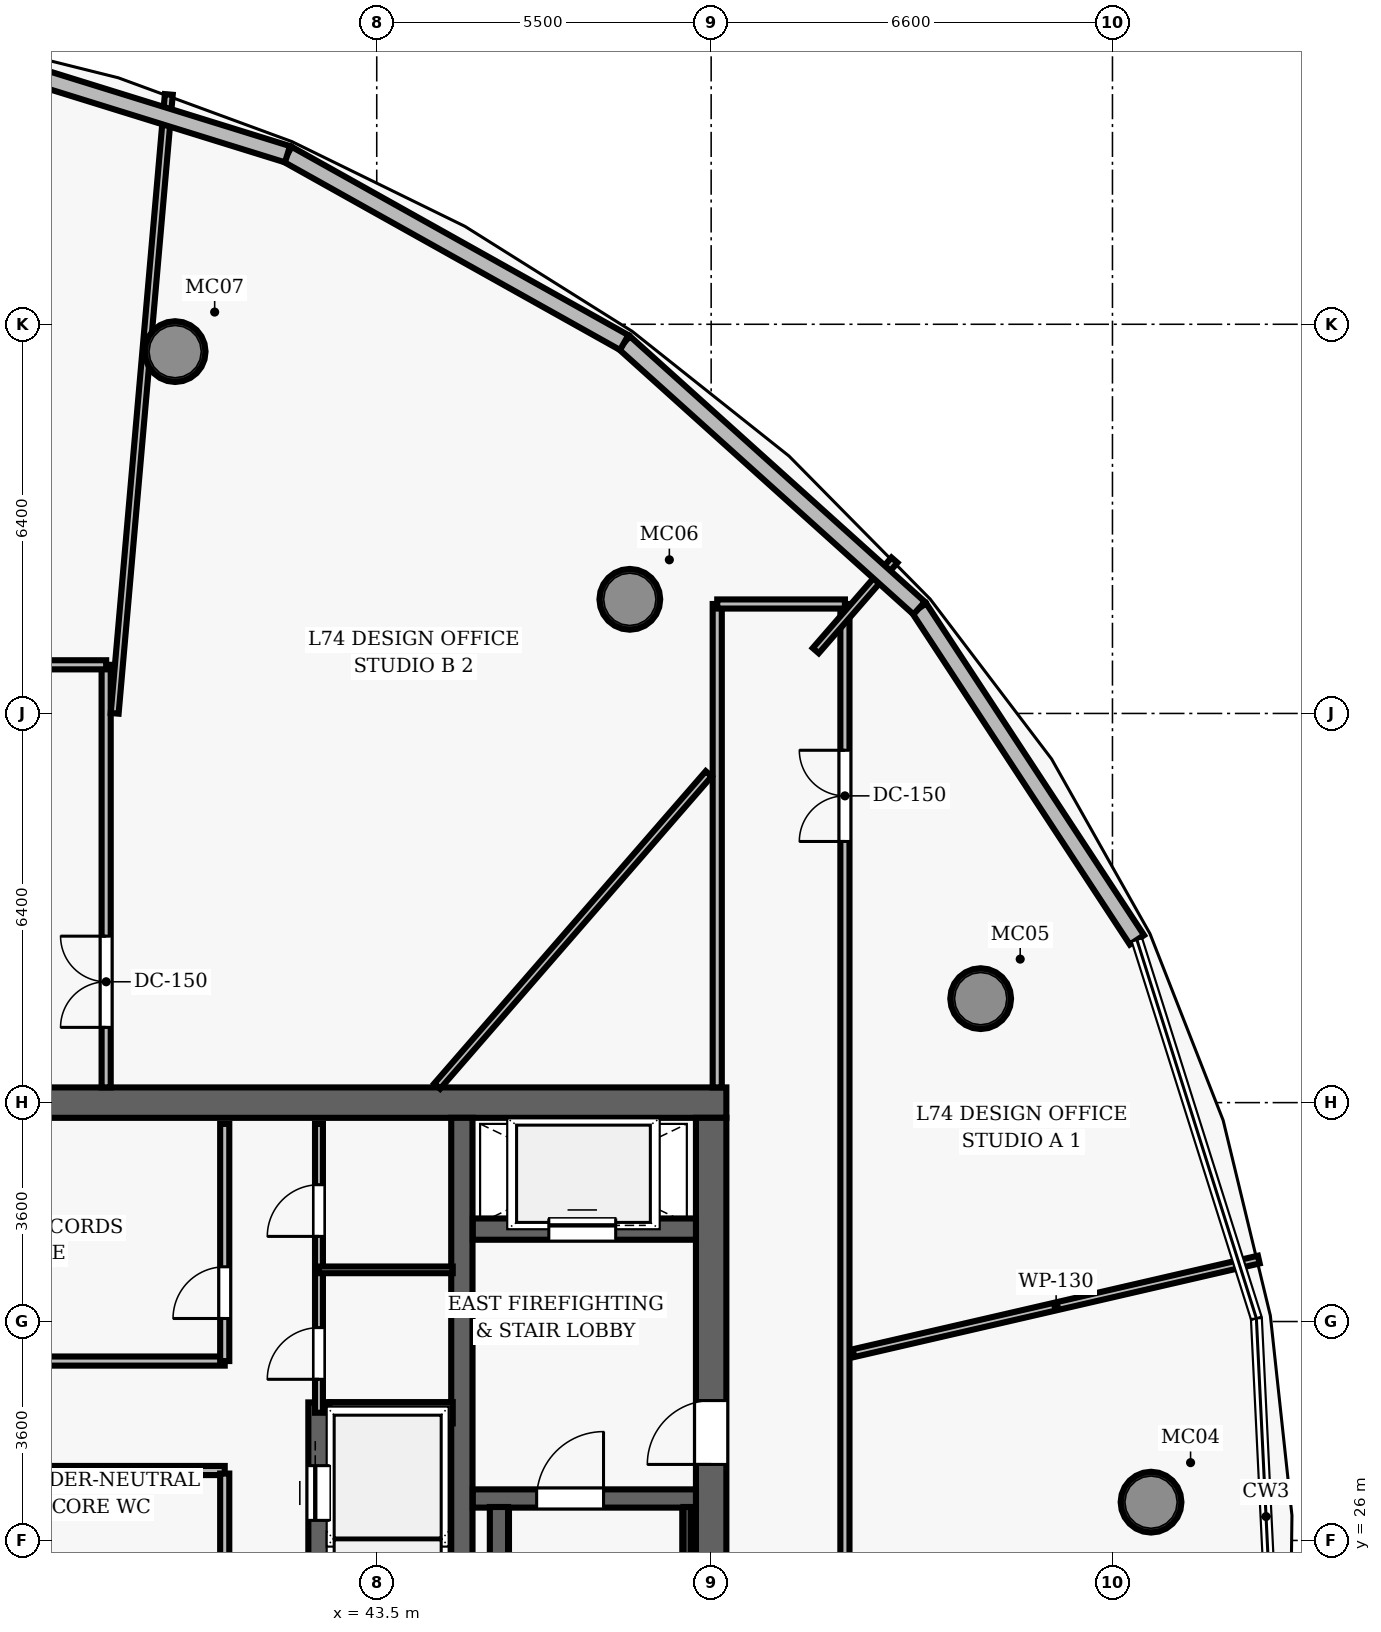
"""IFC4 building model, lengths in metres.
Left out: names, types, materials, properties, quantities, classifications, styles, units other than length and angle.
Written with IfcOpenShell. Run it as: python <this file> out.ifc"""

import sys

from ifc_helpers import new_model, si_unit, direction, frame, frame_2d, origin, origin_2d, place, context, subcontext, project, spatial, rectangle, hollow_circle, extrude, element, fill, save


model = new_model("IFC4")
c1 = context("Model", 3, precision=1e-05, world=origin(), true_north=direction((0.0, 1.0)))
c2 = subcontext(c1, "Body", "Model", "MODEL_VIEW")
j1 = project(units=[si_unit("LENGTHUNIT", "METRE"), si_unit("PLANEANGLEUNIT", "RADIAN")], contexts=[c1])
p1 = place(None, origin())
s1 = spatial("IfcSite", under=j1, at=p1, CompositionType="ELEMENT")
p2 = place(p1, origin())
s2 = spatial("IfcBuilding", under=s1, at=p2, CompositionType="ELEMENT")
p3 = place(p2, frame((0.0, 0.0, 292.1)))
s3 = spatial("IfcBuildingStorey", under=s2, at=p3, CompositionType="ELEMENT", Elevation=292.1)
p4 = place(p3, frame((26.75, 33.2, 0.0), z_axis=(0.0, 0.0, 1.0), x_axis=(1.0, 0.0, 0.0)))
e1 = element("IfcWall", 1, at=p4, inside=s3, PredefinedType="SHEAR", context=c2, shape_type="SweptSolid", body=[
    extrude(rectangle(XDim=22.5, YDim=0.5, at=frame_2d((11.25, 0.0))), origin(), (0.0, 0.0, 1.0), 3.85),
])
p5 = place(p3, frame((49.0, 19.05, 0.0), z_axis=(0.0, 0.0, 1.0), x_axis=(0.0, 1.0, 0.0)))
e2 = element("IfcWall", 2, at=p5, inside=s3, PredefinedType="SHEAR", context=c2, shape_type="SweptSolid", body=[
    extrude(rectangle(XDim=13.9, YDim=0.5, at=frame_2d((6.95, 0.0))), origin(), (0.0, 0.0, 1.0), 3.85),
])
p6 = place(p5, frame((8.2, 0.0, 0.0)))
e3 = element("IfcOpeningElement", 3, at=p6, cuts=e2, PredefinedType="OPENING", context=c2, shape_type="SweptSolid", body=[
    extrude(rectangle(XDim=1.05, YDim=2.15, at=frame_2d((0.525, 1.075))), frame((0.0, 0.26, 0.0), z_axis=(0.0, -1.0, 0.0), x_axis=(1.0, 0.0, 0.0)), (0.0, 0.0, 1.0), 0.52),
])
p7 = place(p3, frame((44.9, 19.05, 0.0), z_axis=(0.0, 0.0, 1.0), x_axis=(0.0, 1.0, 0.0)))
e4 = element("IfcWall", 4, at=p7, inside=s3, PredefinedType="SHEAR", context=c2, shape_type="SweptSolid", body=[
    extrude(rectangle(XDim=13.9, YDim=0.35, at=frame_2d((6.95, 0.0))), origin(), (0.0, 0.0, 1.0), 3.85),
])
for number, where, z_axis, x_axis in (
    (5, (56.235, 26.629, 0.0), (0.0, 0.0, 1.0), (1.0, 0.0, 0.0)),
    (6, (53.433, 34.91, 0.0), (0.0, 0.0, 1.0), (1.0, 0.0, 0.0)),
    (7, (47.662, 41.477, 0.0), (0.0, 0.0, 1.0), (1.0, 0.0, 0.0)),
    (8, (40.185, 45.551, 0.0), (0.0, 0.0, 1.0), (1.0, 0.0, 0.0)),
):
    element("IfcColumn", number, at=place(p3, frame(where, z_axis=z_axis, x_axis=x_axis)), inside=s3, PredefinedType="COLUMN", context=c2, shape_type="SweptSolid", body=[
        extrude(hollow_circle(Radius=0.5, WallThickness=0.045, at=origin_2d()), origin(), (0.0, 0.0, 1.0), 3.85),
    ])
p8 = place(p3, frame((45.08, 26.69, 0.0), z_axis=(0.0, 0.0, 1.0), x_axis=(1.0, 0.0, 0.0)))
e9 = element("IfcWall", 9, at=p8, inside=s3, PredefinedType="SHEAR", context=c2, shape_type="SweptSolid", body=[
    extrude(rectangle(XDim=3.67, YDim=0.3, at=frame_2d((1.835, 0.0))), origin(), (0.0, 0.0, 1.0), 3.85),
])
p9 = place(p8, frame((1.05, 0.0, 0.0)))
e10 = element("IfcOpeningElement", 10, at=p9, cuts=e9, PredefinedType="OPENING", context=c2, shape_type="SweptSolid", body=[
    extrude(rectangle(XDim=1.1, YDim=2.15, at=frame_2d((0.55, 1.075))), frame((0.0, 0.16, 0.0), z_axis=(0.0, -1.0, 0.0), x_axis=(1.0, 0.0, 0.0)), (0.0, 0.0, 1.0), 0.32),
])
p10 = place(p3, frame((45.51, 19.05, 0.0), z_axis=(0.0, 0.0, 1.0), x_axis=(0.0, 1.0, 0.0)))
e11 = element("IfcWall", 11, at=p10, inside=s3, PredefinedType="SHEAR", context=c2, shape_type="SweptSolid", body=[
    extrude(rectangle(XDim=7.5, YDim=0.3, at=frame_2d((3.75, 0.0))), origin(), (0.0, 0.0, 1.0), 3.85),
])
p11 = place(p3, frame((48.605, 19.1, 0.0), z_axis=(0.0, 0.0, 1.0), x_axis=(0.0, 1.0, 0.0)))
e12 = element("IfcWall", 12, at=p11, inside=s3, PredefinedType="SHEAR", context=c2, shape_type="SweptSolid", body=[
    extrude(rectangle(XDim=7.45, YDim=0.12, at=frame_2d((3.725, 0.0))), origin(), (0.0, 0.0, 1.0), 3.85),
])
p12 = place(p3, frame((45.08, 31.12, 0.0), z_axis=(0.0, 0.0, 1.0), x_axis=(1.0, 0.0, 0.0)))
e13 = element("IfcWall", 13, at=p12, inside=s3, PredefinedType="SHEAR", context=c2, shape_type="SweptSolid", body=[
    extrude(rectangle(XDim=3.67, YDim=0.35, at=frame_2d((1.835, 0.0))), origin(), (0.0, 0.0, 1.0), 3.04),
])
p13 = place(p12, frame((1.25, 0.0, 0.0)))
e14 = element("IfcOpeningElement", 14, at=p13, cuts=e13, PredefinedType="OPENING", context=c2, shape_type="SweptSolid", body=[
    extrude(rectangle(XDim=1.1, YDim=2.15, at=frame_2d((0.55, 1.075))), frame((0.0, 0.185, 0.0), z_axis=(0.0, -1.0, 0.0), x_axis=(1.0, 0.0, 0.0)), (0.0, 0.0, 1.0), 0.37),
])
p14 = place(p3, frame((42.55, 21.73, 0.0), z_axis=(0.0, 0.0, 1.0), x_axis=(0.0, 1.0, 0.0)))
e15 = element("IfcWall", 15, at=p14, inside=s3, PredefinedType="SHEAR", context=c2, shape_type="SweptSolid", body=[
    extrude(rectangle(XDim=6.54, YDim=0.35, at=frame_2d((3.27, 0.0))), origin(), (0.0, 0.0, 1.0), 3.04),
])
p15 = place(p14, frame((0.5, 0.0, 0.0)))
e16 = element("IfcOpeningElement", 16, at=p15, cuts=e15, PredefinedType="OPENING", context=c2, shape_type="SweptSolid", body=[
    extrude(rectangle(XDim=0.9, YDim=2.15, at=frame_2d((0.45, 1.075))), frame((0.0, 0.185, 0.0), z_axis=(0.0, -1.0, 0.0), x_axis=(1.0, 0.0, 0.0)), (0.0, 0.0, 1.0), 0.37),
])
p16 = place(p14, frame((2.55, 0.0, 0.0)))
e17 = element("IfcOpeningElement", 17, at=p16, cuts=e15, PredefinedType="OPENING", context=c2, shape_type="SweptSolid", body=[
    extrude(rectangle(XDim=0.9, YDim=2.15, at=frame_2d((0.45, 1.075))), frame((0.0, 0.185, 0.0), z_axis=(0.0, -1.0, 0.0), x_axis=(1.0, 0.0, 0.0)), (0.0, 0.0, 1.0), 0.37),
])
p17 = place(p14, frame((4.6, 0.0, 0.0)))
e18 = element("IfcOpeningElement", 18, at=p17, cuts=e15, PredefinedType="OPENING", context=c2, shape_type="SweptSolid", body=[
    extrude(rectangle(XDim=0.9, YDim=2.15, at=frame_2d((0.45, 1.075))), frame((0.0, 0.185, 0.0), z_axis=(0.0, -1.0, 0.0), x_axis=(1.0, 0.0, 0.0)), (0.0, 0.0, 1.0), 0.37),
])
p18 = place(p3, frame((42.72, 28.1, 0.0), z_axis=(0.0, 0.0, 1.0), x_axis=(1.0, 0.0, 0.0)))
e19 = element("IfcWall", 19, at=p18, inside=s3, PredefinedType="SHEAR", context=c2, shape_type="SweptSolid", body=[
    extrude(rectangle(XDim=2.03, YDim=0.35, at=frame_2d((1.015, 0.0))), origin(), (0.0, 0.0, 1.0), 3.04),
])
for number, where, z_axis, x_axis in (
    (20, (34.64, 27.15, 0.0), (0.0, 0.0, 1.0), (1.0, 0.0, 0.0)),
    (21, (34.64, 28.95, 0.0), (0.0, 0.0, 1.0), (1.0, 0.0, 0.0)),
):
    element("IfcWall", number, at=place(p3, frame(where, z_axis=z_axis, x_axis=x_axis)), inside=s3, PredefinedType="PARTITIONING", context=c2, shape_type="SweptSolid", body=[
        extrude(rectangle(XDim=6.36, YDim=0.15, at=frame_2d((3.18, 0.0))), origin(), (0.0, 0.0, 1.0), 3.04),
    ])
p19 = place(p3, frame((41.0, 28.95, 0.0), z_axis=(0.0, 0.0, 1.0), x_axis=(0.0, 1.0, 0.0)))
e22 = element("IfcWall", 22, at=p19, inside=s3, PredefinedType="PARTITIONING", context=c2, shape_type="SweptSolid", body=[
    extrude(rectangle(XDim=3.9, YDim=0.15, at=frame_2d((1.95, 0.0))), origin(), (0.0, 0.0, 1.0), 3.04),
])
p20 = place(p19, frame((0.7, 0.0, 0.0)))
e23 = element("IfcOpeningElement", 23, at=p20, cuts=e22, PredefinedType="OPENING", context=c2, shape_type="SweptSolid", body=[
    extrude(rectangle(XDim=0.85, YDim=2.1, at=frame_2d((0.425, 1.05))), frame((0.0, 0.085, 0.0), z_axis=(0.0, -1.0, 0.0), x_axis=(1.0, 0.0, 0.0)), (0.0, 0.0, 1.0), 0.17),
])
p21 = place(p3, frame((41.0, 19.15, 0.0), z_axis=(0.0, 0.0, 1.0), x_axis=(0.0, 1.0, 0.0)))
e24 = element("IfcWall", 24, at=p21, inside=s3, PredefinedType="PARTITIONING", context=c2, shape_type="SweptSolid", body=[
    extrude(rectangle(XDim=7.95, YDim=0.15, at=frame_2d((3.975, 0.0))), origin(), (0.0, 0.0, 1.0), 3.04),
])
p22 = place(p21, frame((0.25, 0.0, 0.0)))
e25 = element("IfcOpeningElement", 25, at=p22, cuts=e24, PredefinedType="OPENING", context=c2, shape_type="SweptSolid", body=[
    extrude(rectangle(XDim=0.85, YDim=2.1, at=frame_2d((0.425, 1.05))), frame((0.0, 0.085, 0.0), z_axis=(0.0, -1.0, 0.0), x_axis=(1.0, 0.0, 0.0)), (0.0, 0.0, 1.0), 0.17),
])
p23 = place(p21, frame((2.953, 0.0, 0.0)))
e26 = element("IfcOpeningElement", 26, at=p23, cuts=e24, PredefinedType="OPENING", context=c2, shape_type="SweptSolid", body=[
    extrude(rectangle(XDim=0.85, YDim=2.1, at=frame_2d((0.425, 1.05))), frame((0.0, 0.085, 0.0), z_axis=(0.0, -1.0, 0.0), x_axis=(1.0, 0.0, 0.0)), (0.0, 0.0, 1.0), 0.17),
])
p24 = place(p21, frame((5.576, 0.0, 0.0)))
e27 = element("IfcOpeningElement", 27, at=p24, cuts=e24, PredefinedType="OPENING", context=c2, shape_type="SweptSolid", body=[
    extrude(rectangle(XDim=0.85, YDim=2.1, at=frame_2d((0.425, 1.05))), frame((0.0, 0.085, 0.0), z_axis=(0.0, -1.0, 0.0), x_axis=(1.0, 0.0, 0.0)), (0.0, 0.0, 1.0), 0.17),
])
p25 = place(p3, frame((42.55, 28.1, 0.0), z_axis=(0.0, 0.0, 1.0), x_axis=(0.0, 1.0, 0.0)))
e28 = element("IfcWall", 28, at=p25, inside=s3, PredefinedType="PARTITIONING", context=c2, shape_type="SweptSolid", body=[
    extrude(rectangle(XDim=4.75, YDim=0.13, at=frame_2d((2.375, 0.0))), origin(), (0.0, 0.0, 1.0), 3.04),
])
p26 = place(p25, frame((0.55, 0.0, 0.0)))
e29 = element("IfcOpeningElement", 29, at=p26, cuts=e28, PredefinedType="OPENING", context=c2, shape_type="SweptSolid", body=[
    extrude(rectangle(XDim=0.85, YDim=2.1, at=frame_2d((0.425, 1.05))), frame((0.0, 0.075, 0.0), z_axis=(0.0, -1.0, 0.0), x_axis=(1.0, 0.0, 0.0)), (0.0, 0.0, 1.0), 0.15),
])
p27 = place(p25, frame((2.9, 0.0, 0.0)))
e30 = element("IfcOpeningElement", 30, at=p27, cuts=e28, PredefinedType="OPENING", context=c2, shape_type="SweptSolid", body=[
    extrude(rectangle(XDim=0.85, YDim=2.1, at=frame_2d((0.425, 1.05))), frame((0.0, 0.075, 0.0), z_axis=(0.0, -1.0, 0.0), x_axis=(1.0, 0.0, 0.0)), (0.0, 0.0, 1.0), 0.15),
])
p28 = place(p3, frame((42.55, 30.45, 0.0), z_axis=(0.0, 0.0, 1.0), x_axis=(1.0, 0.0, 0.0)))
e31 = element("IfcWall", 31, at=p28, inside=s3, PredefinedType="PARTITIONING", context=c2, shape_type="SweptSolid", body=[
    extrude(rectangle(XDim=2.2, YDim=0.11, at=frame_2d((1.1, 0.0))), origin(), (0.0, 0.0, 1.0), 3.04),
])
p29 = place(p3, frame((51.2, 10.6, 0.0), z_axis=(0.0, 0.0, 1.0), x_axis=(0.0, 1.0, 0.0)))
e32 = element("IfcWall", 32, at=p29, inside=s3, PredefinedType="PARTITIONING", context=c2, shape_type="SweptSolid", body=[
    extrude(rectangle(XDim=30.8, YDim=0.15, at=frame_2d((15.4, 0.0))), origin(), (0.0, 0.0, 1.0), 3.04),
])
p30 = place(p29, frame((26.895, 0.0, 0.0)))
e33 = element("IfcOpeningElement", 33, at=p30, cuts=e32, PredefinedType="OPENING", context=c2, shape_type="SweptSolid", body=[
    extrude(rectangle(XDim=1.5, YDim=2.2, at=frame_2d((0.75, 1.1))), frame((0.0, 0.085, 0.0), z_axis=(0.0, -1.0, 0.0), x_axis=(1.0, 0.0, 0.0)), (0.0, 0.0, 1.0), 0.17),
])
p31 = place(p29, frame((11.03, 0.0, 0.0)))
e34 = element("IfcOpeningElement", 34, at=p31, cuts=e32, PredefinedType="OPENING", context=c2, shape_type="SweptSolid", body=[
    extrude(rectangle(XDim=1.5, YDim=2.2, at=frame_2d((0.75, 1.1))), frame((0.0, 0.085, 0.0), z_axis=(0.0, -1.0, 0.0), x_axis=(1.0, 0.0, 0.0)), (0.0, 0.0, 1.0), 0.17),
])
p32 = place(p3, frame((49.1, 33.45, 0.0), z_axis=(0.0, 0.0, 1.0), x_axis=(0.0, 1.0, 0.0)))
e35 = element("IfcWall", 35, at=p32, inside=s3, PredefinedType="PARTITIONING", context=c2, shape_type="SweptSolid", body=[
    extrude(rectangle(XDim=7.95, YDim=0.15, at=frame_2d((3.975, 0.0))), origin(), (0.0, 0.0, 1.0), 3.04),
])
p33 = place(p3, frame((49.1, 41.4, 0.0), z_axis=(0.0, 0.0, 1.0), x_axis=(1.0, 0.0, 0.0)))
e36 = element("IfcWall", 36, at=p33, inside=s3, PredefinedType="PARTITIONING", context=c2, shape_type="SweptSolid", body=[
    extrude(rectangle(XDim=2.1, YDim=0.15, at=frame_2d((1.05, 0.0))), origin(), (0.0, 0.0, 1.0), 3.04),
])
p34 = place(p3, frame((39.05, 33.45, 0.0), z_axis=(0.0, 0.0, 1.0), x_axis=(0.0, 1.0, 0.0)))
e37 = element("IfcWall", 37, at=p34, inside=s3, PredefinedType="PARTITIONING", context=c2, shape_type="SweptSolid", body=[
    extrude(rectangle(XDim=6.95, YDim=0.15, at=frame_2d((3.475, 0.0))), origin(), (0.0, 0.0, 1.0), 3.04),
])
p35 = place(p34, frame((0.988, 0.0, 0.0)))
e38 = element("IfcOpeningElement", 38, at=p35, cuts=e37, PredefinedType="OPENING", context=c2, shape_type="SweptSolid", body=[
    extrude(rectangle(XDim=1.5, YDim=2.2, at=frame_2d((0.75, 1.1))), frame((0.0, 0.085, 0.0), z_axis=(0.0, -1.0, 0.0), x_axis=(1.0, 0.0, 0.0)), (0.0, 0.0, 1.0), 0.17),
])
p36 = place(p3, frame((36.95, 40.4, 0.0), z_axis=(0.0, 0.0, 1.0), x_axis=(1.0, 0.0, 0.0)))
e39 = element("IfcWall", 39, at=p36, inside=s3, PredefinedType="PARTITIONING", context=c2, shape_type="SweptSolid", body=[
    extrude(rectangle(XDim=2.1, YDim=0.15, at=frame_2d((1.05, 0.0))), origin(), (0.0, 0.0, 1.0), 3.04),
])
p37 = place(p3, frame((51.34, 29.08, 0.0), z_axis=(0.0, 0.0, 1.0), x_axis=(0.974374354779, 0.22493247153, 0.0)))
e40 = element("IfcWall", 40, at=p37, inside=s3, PredefinedType="PARTITIONING", context=c2, shape_type="SweptSolid", body=[
    extrude(rectangle(XDim=6.842, YDim=0.13, at=frame_2d((3.421, 0.0))), origin(), (0.0, 0.0, 1.0), 3.04),
])
p38 = place(p3, frame((44.494, 33.47, 0.0), z_axis=(0.0, 0.0, 1.0), x_axis=(0.656056181598, 0.754712055414, 0.0)))
e41 = element("IfcWall", 41, at=p38, inside=s3, PredefinedType="PARTITIONING", context=c2, shape_type="SweptSolid", body=[
    extrude(rectangle(XDim=6.808, YDim=0.13, at=frame_2d((3.404, 0.0))), origin(), (0.0, 0.0, 1.0), 3.04),
])
p39 = place(p3, frame((50.72, 40.633, 0.0), z_axis=(0.0, 0.0, 1.0), x_axis=(0.656126618978, 0.754650819829, 0.0)))
e42 = element("IfcWall", 42, at=p39, inside=s3, PredefinedType="PARTITIONING", context=c2, shape_type="SweptSolid", body=[
    extrude(rectangle(XDim=1.972, YDim=0.13, at=frame_2d((0.986, 0.0))), origin(), (0.0, 0.0, 1.0), 3.04),
])
p40 = place(p3, frame((39.19, 39.602, 0.0), z_axis=(0.0, 0.0, 1.0), x_axis=(0.087171989562, 0.996193276546, 0.0)))
e43 = element("IfcWall", 43, at=p40, inside=s3, PredefinedType="PARTITIONING", context=c2, shape_type="SweptSolid", body=[
    extrude(rectangle(XDim=10.217, YDim=0.13, at=frame_2d((5.108, 0.0))), origin(), (0.0, 0.0, 1.0), 3.04),
])
p41 = place(p3, frame((52.421, 41.333, 0.0), z_axis=(0.0, 0.0, 1.0), x_axis=(0.548729972559, -0.835999651445, 0.0)))
e44 = element("IfcWall", 44, at=p41, inside=s3, PredefinedType="SOLIDWALL", context=c2, shape_type="SweptSolid", body=[
    extrude(rectangle(XDim=6.527, YDim=0.28, at=frame_2d((3.263, 0.0))), origin(), (0.0, 0.0, 1.0), 3.625),
])
p42 = place(p3, frame((47.57, 45.699, 0.0), z_axis=(0.0, 0.0, 1.0), x_axis=(0.743242060742, -0.669022599875, 0.0)))
e45 = element("IfcWall", 45, at=p42, inside=s3, PredefinedType="SOLIDWALL", context=c2, shape_type="SweptSolid", body=[
    extrude(rectangle(XDim=6.526, YDim=0.28, at=frame_2d((3.263, 0.0))), origin(), (0.0, 0.0, 1.0), 3.625),
])
p43 = place(p3, frame((42.032, 48.797, 0.0), z_axis=(0.0, 0.0, 1.0), x_axis=(0.872743421577, -0.48817918851, 0.0)))
e46 = element("IfcWall", 46, at=p43, inside=s3, PredefinedType="SOLIDWALL", context=c2, shape_type="SweptSolid", body=[
    extrude(rectangle(XDim=6.345, YDim=0.28, at=frame_2d((3.173, 0.0))), origin(), (0.0, 0.0, 1.0), 3.625),
])
p44 = place(p3, frame((36.436, 50.534, 0.0), z_axis=(0.0, 0.0, 1.0), x_axis=(0.955052748682, -0.296435907467, 0.0)))
e47 = element("IfcWall", 47, at=p44, inside=s3, PredefinedType="SOLIDWALL", context=c2, shape_type="SweptSolid", body=[
    extrude(rectangle(XDim=5.86, YDim=0.28, at=frame_2d((2.93, 0.0))), origin(), (0.0, 0.0, 1.0), 3.625),
])
p45 = place(p9, origin())
e48 = element("IfcDoor", 48, at=p45, inside=s3, OperationType="SINGLE_SWING_RIGHT", PredefinedType="DOOR", context=c2, shape_type="SweptSolid", body=[
    extrude(rectangle(XDim=1.1, YDim=2.15, at=frame_2d((0.55, 1.075))), frame((0.0, 0.025, 0.0), z_axis=(0.0, -1.0, 0.0), x_axis=(1.0, 0.0, 0.0)), (0.0, 0.0, 1.0), 0.05),
])
fill(e10, e48)
p46 = place(p6, origin())
e49 = element("IfcDoor", 49, at=p46, inside=s3, OperationType="SINGLE_SWING_LEFT", PredefinedType="DOOR", context=c2, shape_type="SweptSolid", body=[
    extrude(rectangle(XDim=1.05, YDim=2.15, at=frame_2d((0.525, 1.075))), frame((0.0, 0.025, 0.0), z_axis=(0.0, -1.0, 0.0), x_axis=(1.0, 0.0, 0.0)), (0.0, 0.0, 1.0), 0.05),
])
fill(e3, e49)
p47 = place(p20, origin())
e50 = element("IfcDoor", 50, at=p47, inside=s3, OperationType="SINGLE_SWING_LEFT", PredefinedType="DOOR", context=c2, shape_type="SweptSolid", body=[
    extrude(rectangle(XDim=0.85, YDim=2.1, at=frame_2d((0.425, 1.05))), frame((0.0, 0.025, 0.0), z_axis=(0.0, -1.0, 0.0), x_axis=(1.0, 0.0, 0.0)), (0.0, 0.0, 1.0), 0.05),
])
fill(e23, e50)
p48 = place(p26, origin())
e51 = element("IfcDoor", 51, at=p48, inside=s3, OperationType="SINGLE_SWING_LEFT", PredefinedType="DOOR", context=c2, shape_type="SweptSolid", body=[
    extrude(rectangle(XDim=0.85, YDim=2.1, at=frame_2d((0.425, 1.05))), frame((0.0, 0.025, 0.0), z_axis=(0.0, -1.0, 0.0), x_axis=(1.0, 0.0, 0.0)), (0.0, 0.0, 1.0), 0.05),
])
fill(e29, e51)
p49 = place(p27, origin())
e52 = element("IfcDoor", 52, at=p49, inside=s3, OperationType="SINGLE_SWING_LEFT", PredefinedType="DOOR", context=c2, shape_type="SweptSolid", body=[
    extrude(rectangle(XDim=0.85, YDim=2.1, at=frame_2d((0.425, 1.05))), frame((0.0, 0.025, 0.0), z_axis=(0.0, -1.0, 0.0), x_axis=(1.0, 0.0, 0.0)), (0.0, 0.0, 1.0), 0.05),
])
fill(e30, e52)
p50 = place(p30, origin())
e53 = element("IfcDoor", 53, at=p50, inside=s3, OperationType="DOUBLE_DOOR_SINGLE_SWING", PredefinedType="DOOR", context=c2, shape_type="SweptSolid", body=[
    extrude(rectangle(XDim=1.5, YDim=2.2, at=frame_2d((0.75, 1.1))), frame((0.0, 0.025, 0.0), z_axis=(0.0, -1.0, 0.0), x_axis=(1.0, 0.0, 0.0)), (0.0, 0.0, 1.0), 0.05),
])
fill(e33, e53)
p51 = place(p35, origin())
e54 = element("IfcDoor", 54, at=p51, inside=s3, OperationType="DOUBLE_DOOR_SINGLE_SWING", PredefinedType="DOOR", context=c2, shape_type="SweptSolid", body=[
    extrude(rectangle(XDim=1.5, YDim=2.2, at=frame_2d((0.75, 1.1))), frame((0.0, 0.025, 0.0), z_axis=(0.0, -1.0, 0.0), x_axis=(1.0, 0.0, 0.0)), (0.0, 0.0, 1.0), 0.05),
])
fill(e38, e54)
p52 = place(p17, origin())
e55 = element("IfcDoor", 55, at=p52, inside=s3, OperationType="SLIDING_TO_LEFT", PredefinedType="DOOR", context=c2, shape_type="SweptSolid", body=[
    extrude(rectangle(XDim=0.9, YDim=2.15, at=frame_2d((0.45, 1.075))), frame((0.0, 0.025, 0.0), z_axis=(0.0, -1.0, 0.0), x_axis=(1.0, 0.0, 0.0)), (0.0, 0.0, 1.0), 0.05),
])
fill(e18, e55)
p53 = place(p13, origin())
e56 = element("IfcDoor", 56, at=p53, inside=s3, OperationType="SLIDING_TO_LEFT", PredefinedType="DOOR", context=c2, shape_type="SweptSolid", body=[
    extrude(rectangle(XDim=1.1, YDim=2.15, at=frame_2d((0.55, 1.075))), frame((0.0, 0.025, 0.0), z_axis=(0.0, -1.0, 0.0), x_axis=(1.0, 0.0, 0.0)), (0.0, 0.0, 1.0), 0.05),
])
fill(e14, e56)
save(model, sys.argv[1])
